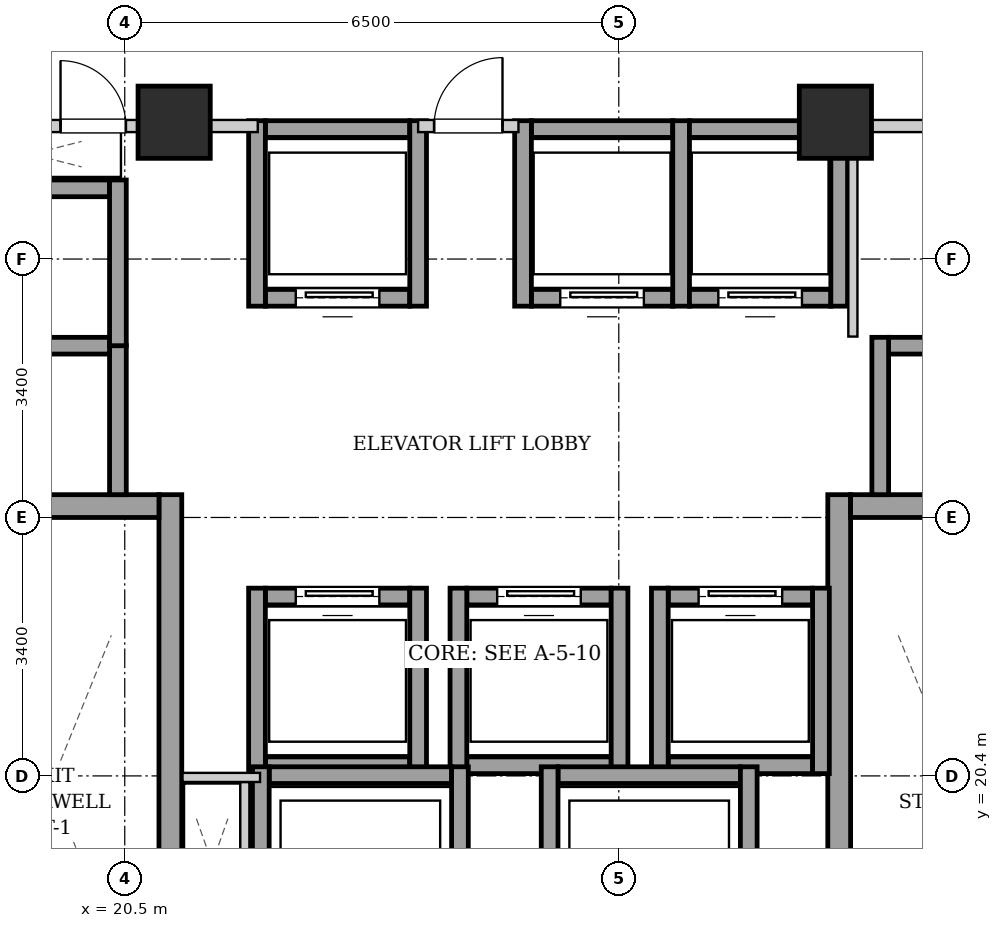
"""IFC4 building model, lengths in metres.
Left out: names, types, materials, properties, quantities, classifications, styles, units other than length and angle.
Written with IfcOpenShell. Run it as: python <this file> out.ifc"""

import sys

from ifc_helpers import new_model, si_unit, direction, frame, frame_2d, origin, origin_2d, place, context, subcontext, project, spatial, rectangle, extrude, element, fill, save


model = new_model("IFC4")
c1 = context("Model", 3, precision=1e-05, world=origin(), true_north=direction((0.0, 1.0)))
c2 = subcontext(c1, "Body", "Model", "MODEL_VIEW")
j1 = project(units=[si_unit("LENGTHUNIT", "METRE"), si_unit("PLANEANGLEUNIT", "RADIAN")], contexts=[c1])
p1 = place(None, origin())
s1 = spatial("IfcSite", under=j1, at=p1, CompositionType="ELEMENT")
p2 = place(p1, origin())
s2 = spatial("IfcBuilding", under=s1, at=p2, CompositionType="ELEMENT")
p3 = place(p2, frame((0.0, 0.0, 124.4)))
s3 = spatial("IfcBuildingStorey", under=s2, at=p3, CompositionType="ELEMENT", Elevation=124.4)
for number, where, z_axis, x_axis in (
    (1, (21.15, 29.0, 0.0), (0.0, 0.0, 1.0), (1.0, 0.0, 0.0)),
    (2, (29.85, 29.0, 0.0), (0.0, 0.0, 1.0), (1.0, 0.0, 0.0)),
):
    element("IfcColumn", number, at=place(p3, frame(where, z_axis=z_axis, x_axis=x_axis)), inside=s3, PredefinedType="COLUMN", context=c2, shape_type="SweptSolid", body=[
        extrude(rectangle(XDim=0.95, YDim=0.95, at=origin_2d()), origin(), (0.0, 0.0, 1.0), 3.25),
    ])
p4 = place(p3, frame((21.1, 15.1, 0.0), z_axis=(0.0, 0.0, 1.0), x_axis=(0.0, 1.0, 0.0)))
e3 = element("IfcWall", 3, at=p4, inside=s3, PredefinedType="SHEAR", context=c2, shape_type="SweptSolid", body=[
    extrude(rectangle(XDim=9.0, YDim=0.3, at=frame_2d((4.5, 0.0))), origin(), (0.0, 0.0, 1.0), 2.99),
])
p5 = place(p3, frame((18.1, 23.95, 0.0), z_axis=(0.0, 0.0, 1.0), x_axis=(1.0, 0.0, 0.0)))
e4 = element("IfcWall", 4, at=p5, inside=s3, PredefinedType="SHEAR", context=c2, shape_type="SweptSolid", body=[
    extrude(rectangle(XDim=2.85, YDim=0.3, at=frame_2d((1.425, 0.0))), origin(), (0.0, 0.0, 1.0), 2.99),
])
p6 = place(p3, frame((29.9, 15.1, 0.0), z_axis=(0.0, 0.0, 1.0), x_axis=(0.0, 1.0, 0.0)))
e5 = element("IfcWall", 5, at=p6, inside=s3, PredefinedType="SHEAR", context=c2, shape_type="SweptSolid", body=[
    extrude(rectangle(XDim=9.0, YDim=0.3, at=frame_2d((4.5, 0.0))), origin(), (0.0, 0.0, 1.0), 2.99),
])
p7 = place(p3, frame((30.05, 23.95, 0.0), z_axis=(0.0, 0.0, 1.0), x_axis=(1.0, 0.0, 0.0)))
e6 = element("IfcWall", 6, at=p7, inside=s3, PredefinedType="SHEAR", context=c2, shape_type="SweptSolid", body=[
    extrude(rectangle(XDim=2.85, YDim=0.3, at=frame_2d((1.425, 0.0))), origin(), (0.0, 0.0, 1.0), 2.99),
])
p8 = place(p3, frame((22.35, 26.69, 0.0), z_axis=(0.0, 0.0, 1.0), x_axis=(1.0, 0.0, 0.0)))
e7 = element("IfcWall", 7, at=p8, inside=s3, PredefinedType="SHEAR", context=c2, shape_type="SweptSolid", body=[
    extrude(rectangle(XDim=1.9, YDim=0.22, at=frame_2d((0.95, 0.0))), origin(), (0.0, 0.0, 1.0), 2.99),
])
p9 = place(p8, frame((0.4, 0.0, 0.0)))
e8 = element("IfcOpeningElement", 8, at=p9, cuts=e7, PredefinedType="OPENING", context=c2, shape_type="SweptSolid", body=[
    extrude(rectangle(XDim=1.1, YDim=2.15, at=frame_2d((0.55, 1.075))), frame((0.0, 0.12, 0.0), z_axis=(0.0, -1.0, 0.0), x_axis=(1.0, 0.0, 0.0)), (0.0, 0.0, 1.0), 0.24),
])
p10 = place(p3, frame((22.35, 28.91, 0.0), z_axis=(0.0, 0.0, 1.0), x_axis=(1.0, 0.0, 0.0)))
e9 = element("IfcWall", 9, at=p10, inside=s3, PredefinedType="SHEAR", context=c2, shape_type="SweptSolid", body=[
    extrude(rectangle(XDim=1.9, YDim=0.22, at=frame_2d((0.95, 0.0))), origin(), (0.0, 0.0, 1.0), 2.99),
])
for number, where, z_axis, x_axis in (
    (10, (22.24, 26.58, 0.0), (0.0, 0.0, 1.0), (0.0, 1.0, 0.0)),
    (11, (24.36, 26.58, 0.0), (0.0, 0.0, 1.0), (0.0, 1.0, 0.0)),
):
    element("IfcWall", number, at=place(p3, frame(where, z_axis=z_axis, x_axis=x_axis)), inside=s3, PredefinedType="SHEAR", context=c2, shape_type="SweptSolid", body=[
        extrude(rectangle(XDim=2.44, YDim=0.22, at=frame_2d((1.22, 0.0))), origin(), (0.0, 0.0, 1.0), 2.99),
    ])
p11 = place(p3, frame((25.85, 26.69, 0.0), z_axis=(0.0, 0.0, 1.0), x_axis=(1.0, 0.0, 0.0)))
e12 = element("IfcWall", 12, at=p11, inside=s3, PredefinedType="SHEAR", context=c2, shape_type="SweptSolid", body=[
    extrude(rectangle(XDim=1.86, YDim=0.22, at=frame_2d((0.93, 0.0))), origin(), (0.0, 0.0, 1.0), 2.99),
])
p12 = place(p11, frame((0.38, 0.0, 0.0)))
e13 = element("IfcOpeningElement", 13, at=p12, cuts=e12, PredefinedType="OPENING", context=c2, shape_type="SweptSolid", body=[
    extrude(rectangle(XDim=1.1, YDim=2.15, at=frame_2d((0.55, 1.075))), frame((0.0, 0.12, 0.0), z_axis=(0.0, -1.0, 0.0), x_axis=(1.0, 0.0, 0.0)), (0.0, 0.0, 1.0), 0.24),
])
p13 = place(p3, frame((25.85, 28.91, 0.0), z_axis=(0.0, 0.0, 1.0), x_axis=(1.0, 0.0, 0.0)))
e14 = element("IfcWall", 14, at=p13, inside=s3, PredefinedType="SHEAR", context=c2, shape_type="SweptSolid", body=[
    extrude(rectangle(XDim=1.86, YDim=0.22, at=frame_2d((0.93, 0.0))), origin(), (0.0, 0.0, 1.0), 2.99),
])
for number, where, z_axis, x_axis in (
    (15, (25.74, 26.58, 0.0), (0.0, 0.0, 1.0), (0.0, 1.0, 0.0)),
    (16, (27.82, 26.58, 0.0), (0.0, 0.0, 1.0), (0.0, 1.0, 0.0)),
):
    element("IfcWall", number, at=place(p3, frame(where, z_axis=z_axis, x_axis=x_axis)), inside=s3, PredefinedType="SHEAR", context=c2, shape_type="SweptSolid", body=[
        extrude(rectangle(XDim=2.44, YDim=0.22, at=frame_2d((1.22, 0.0))), origin(), (0.0, 0.0, 1.0), 2.99),
    ])
p14 = place(p3, frame((27.93, 26.69, 0.0), z_axis=(0.0, 0.0, 1.0), x_axis=(1.0, 0.0, 0.0)))
e17 = element("IfcWall", 17, at=p14, inside=s3, PredefinedType="SHEAR", context=c2, shape_type="SweptSolid", body=[
    extrude(rectangle(XDim=1.86, YDim=0.22, at=frame_2d((0.93, 0.0))), origin(), (0.0, 0.0, 1.0), 2.99),
])
p15 = place(p14, frame((0.38, 0.0, 0.0)))
e18 = element("IfcOpeningElement", 18, at=p15, cuts=e17, PredefinedType="OPENING", context=c2, shape_type="SweptSolid", body=[
    extrude(rectangle(XDim=1.1, YDim=2.15, at=frame_2d((0.55, 1.075))), frame((0.0, 0.12, 0.0), z_axis=(0.0, -1.0, 0.0), x_axis=(1.0, 0.0, 0.0)), (0.0, 0.0, 1.0), 0.24),
])
p16 = place(p3, frame((27.93, 28.91, 0.0), z_axis=(0.0, 0.0, 1.0), x_axis=(1.0, 0.0, 0.0)))
e19 = element("IfcWall", 19, at=p16, inside=s3, PredefinedType="SHEAR", context=c2, shape_type="SweptSolid", body=[
    extrude(rectangle(XDim=1.86, YDim=0.22, at=frame_2d((0.93, 0.0))), origin(), (0.0, 0.0, 1.0), 2.99),
])
p17 = place(p3, frame((29.9, 26.58, 0.0), z_axis=(0.0, 0.0, 1.0), x_axis=(0.0, 1.0, 0.0)))
e20 = element("IfcWall", 20, at=p17, inside=s3, PredefinedType="SHEAR", context=c2, shape_type="SweptSolid", body=[
    extrude(rectangle(XDim=2.44, YDim=0.22, at=frame_2d((1.22, 0.0))), origin(), (0.0, 0.0, 1.0), 2.99),
])
p18 = place(p3, frame((22.35, 20.54, 0.0), z_axis=(0.0, 0.0, 1.0), x_axis=(1.0, 0.0, 0.0)))
e21 = element("IfcWall", 21, at=p18, inside=s3, PredefinedType="SHEAR", context=c2, shape_type="SweptSolid", body=[
    extrude(rectangle(XDim=1.9, YDim=0.22, at=frame_2d((0.95, 0.0))), origin(), (0.0, 0.0, 1.0), 2.99),
])
p19 = place(p3, frame((22.35, 22.76, 0.0), z_axis=(0.0, 0.0, 1.0), x_axis=(1.0, 0.0, 0.0)))
e22 = element("IfcWall", 22, at=p19, inside=s3, PredefinedType="SHEAR", context=c2, shape_type="SweptSolid", body=[
    extrude(rectangle(XDim=1.9, YDim=0.22, at=frame_2d((0.95, 0.0))), origin(), (0.0, 0.0, 1.0), 2.99),
])
p20 = place(p19, frame((0.4, 0.0, 0.0)))
e23 = element("IfcOpeningElement", 23, at=p20, cuts=e22, PredefinedType="OPENING", context=c2, shape_type="SweptSolid", body=[
    extrude(rectangle(XDim=1.1, YDim=2.15, at=frame_2d((0.55, 1.075))), frame((0.0, 0.12, 0.0), z_axis=(0.0, -1.0, 0.0), x_axis=(1.0, 0.0, 0.0)), (0.0, 0.0, 1.0), 0.24),
])
for number, where, z_axis, x_axis in (
    (24, (22.24, 20.43, 0.0), (0.0, 0.0, 1.0), (0.0, 1.0, 0.0)),
    (25, (24.36, 20.43, 0.0), (0.0, 0.0, 1.0), (0.0, 1.0, 0.0)),
):
    element("IfcWall", number, at=place(p3, frame(where, z_axis=z_axis, x_axis=x_axis)), inside=s3, PredefinedType="SHEAR", context=c2, shape_type="SweptSolid", body=[
        extrude(rectangle(XDim=2.44, YDim=0.22, at=frame_2d((1.22, 0.0))), origin(), (0.0, 0.0, 1.0), 2.99),
    ])
p21 = place(p3, frame((25.0, 20.54, 0.0), z_axis=(0.0, 0.0, 1.0), x_axis=(1.0, 0.0, 0.0)))
e26 = element("IfcWall", 26, at=p21, inside=s3, PredefinedType="SHEAR", context=c2, shape_type="SweptSolid", body=[
    extrude(rectangle(XDim=1.9, YDim=0.22, at=frame_2d((0.95, 0.0))), origin(), (0.0, 0.0, 1.0), 2.99),
])
p22 = place(p3, frame((25.0, 22.76, 0.0), z_axis=(0.0, 0.0, 1.0), x_axis=(1.0, 0.0, 0.0)))
e27 = element("IfcWall", 27, at=p22, inside=s3, PredefinedType="SHEAR", context=c2, shape_type="SweptSolid", body=[
    extrude(rectangle(XDim=1.9, YDim=0.22, at=frame_2d((0.95, 0.0))), origin(), (0.0, 0.0, 1.0), 2.99),
])
p23 = place(p22, frame((0.4, 0.0, 0.0)))
e28 = element("IfcOpeningElement", 28, at=p23, cuts=e27, PredefinedType="OPENING", context=c2, shape_type="SweptSolid", body=[
    extrude(rectangle(XDim=1.1, YDim=2.15, at=frame_2d((0.55, 1.075))), frame((0.0, 0.12, 0.0), z_axis=(0.0, -1.0, 0.0), x_axis=(1.0, 0.0, 0.0)), (0.0, 0.0, 1.0), 0.24),
])
for number, where, z_axis, x_axis in (
    (29, (24.89, 20.43, 0.0), (0.0, 0.0, 1.0), (0.0, 1.0, 0.0)),
    (30, (27.01, 20.43, 0.0), (0.0, 0.0, 1.0), (0.0, 1.0, 0.0)),
):
    element("IfcWall", number, at=place(p3, frame(where, z_axis=z_axis, x_axis=x_axis)), inside=s3, PredefinedType="SHEAR", context=c2, shape_type="SweptSolid", body=[
        extrude(rectangle(XDim=2.44, YDim=0.22, at=frame_2d((1.22, 0.0))), origin(), (0.0, 0.0, 1.0), 2.99),
    ])
p24 = place(p3, frame((27.65, 20.54, 0.0), z_axis=(0.0, 0.0, 1.0), x_axis=(1.0, 0.0, 0.0)))
e31 = element("IfcWall", 31, at=p24, inside=s3, PredefinedType="SHEAR", context=c2, shape_type="SweptSolid", body=[
    extrude(rectangle(XDim=1.9, YDim=0.22, at=frame_2d((0.95, 0.0))), origin(), (0.0, 0.0, 1.0), 2.99),
])
p25 = place(p3, frame((27.65, 22.76, 0.0), z_axis=(0.0, 0.0, 1.0), x_axis=(1.0, 0.0, 0.0)))
e32 = element("IfcWall", 32, at=p25, inside=s3, PredefinedType="SHEAR", context=c2, shape_type="SweptSolid", body=[
    extrude(rectangle(XDim=1.9, YDim=0.22, at=frame_2d((0.95, 0.0))), origin(), (0.0, 0.0, 1.0), 2.99),
])
p26 = place(p25, frame((0.4, 0.0, 0.0)))
e33 = element("IfcOpeningElement", 33, at=p26, cuts=e32, PredefinedType="OPENING", context=c2, shape_type="SweptSolid", body=[
    extrude(rectangle(XDim=1.1, YDim=2.15, at=frame_2d((0.55, 1.075))), frame((0.0, 0.12, 0.0), z_axis=(0.0, -1.0, 0.0), x_axis=(1.0, 0.0, 0.0)), (0.0, 0.0, 1.0), 0.24),
])
for number, where, z_axis, x_axis in (
    (34, (27.54, 20.43, 0.0), (0.0, 0.0, 1.0), (0.0, 1.0, 0.0)),
    (35, (29.66, 20.43, 0.0), (0.0, 0.0, 1.0), (0.0, 1.0, 0.0)),
):
    element("IfcWall", number, at=place(p3, frame(where, z_axis=z_axis, x_axis=x_axis)), inside=s3, PredefinedType="SHEAR", context=c2, shape_type="SweptSolid", body=[
        extrude(rectangle(XDim=2.44, YDim=0.22, at=frame_2d((1.22, 0.0))), origin(), (0.0, 0.0, 1.0), 2.99),
    ])
p27 = place(p3, frame((20.41, 24.1, 0.0), z_axis=(0.0, 0.0, 1.0), x_axis=(0.0, 1.0, 0.0)))
e36 = element("IfcWall", 36, at=p27, inside=s3, PredefinedType="SHEAR", context=c2, shape_type="SweptSolid", body=[
    extrude(rectangle(XDim=1.96, YDim=0.22, at=frame_2d((0.98, 0.0))), origin(), (0.0, 0.0, 1.0), 2.99),
])
for number, where, z_axis, x_axis in (
    (37, (18.4, 26.06, 0.0), (0.0, 0.0, 1.0), (1.0, 0.0, 0.0)),
    (38, (18.4, 28.13, 0.0), (0.0, 0.0, 1.0), (1.0, 0.0, 0.0)),
):
    element("IfcWall", number, at=place(p3, frame(where, z_axis=z_axis, x_axis=x_axis)), inside=s3, PredefinedType="SHEAR", context=c2, shape_type="SweptSolid", body=[
        extrude(rectangle(XDim=1.9, YDim=0.22, at=frame_2d((0.95, 0.0))), origin(), (0.0, 0.0, 1.0), 2.99),
    ])
p28 = place(p3, frame((20.41, 26.06, 0.0), z_axis=(0.0, 0.0, 1.0), x_axis=(0.0, 1.0, 0.0)))
e39 = element("IfcWall", 39, at=p28, inside=s3, PredefinedType="SHEAR", context=c2, shape_type="SweptSolid", body=[
    extrude(rectangle(XDim=2.18, YDim=0.22, at=frame_2d((1.09, 0.0))), origin(), (0.0, 0.0, 1.0), 2.99),
])
p29 = place(p3, frame((30.55, 26.06, 0.0), z_axis=(0.0, 0.0, 1.0), x_axis=(1.0, 0.0, 0.0)))
e40 = element("IfcWall", 40, at=p29, inside=s3, PredefinedType="SHEAR", context=c2, shape_type="SweptSolid", body=[
    extrude(rectangle(XDim=1.9, YDim=0.22, at=frame_2d((0.95, 0.0))), origin(), (0.0, 0.0, 1.0), 2.99),
])
p30 = place(p3, frame((30.44, 24.1, 0.0), z_axis=(0.0, 0.0, 1.0), x_axis=(0.0, 1.0, 0.0)))
e41 = element("IfcWall", 41, at=p30, inside=s3, PredefinedType="SHEAR", context=c2, shape_type="SweptSolid", body=[
    extrude(rectangle(XDim=2.07, YDim=0.22, at=frame_2d((1.035, 0.0))), origin(), (0.0, 0.0, 1.0), 2.99),
])
p31 = place(p3, frame((22.4, 20.41, 0.0), z_axis=(0.0, 0.0, 1.0), x_axis=(1.0, 0.0, 0.0)))
e42 = element("IfcWall", 42, at=p31, inside=s3, PredefinedType="SHEAR", context=c2, shape_type="SweptSolid", body=[
    extrude(rectangle(XDim=2.4, YDim=0.22, at=frame_2d((1.2, 0.0))), origin(), (0.0, 0.0, 1.0), 2.99),
])
for number, where, z_axis, x_axis in (
    (43, (22.29, 17.98, 0.0), (0.0, 0.0, 1.0), (0.0, 1.0, 0.0)),
    (44, (24.91, 17.98, 0.0), (0.0, 0.0, 1.0), (0.0, 1.0, 0.0)),
):
    element("IfcWall", number, at=place(p3, frame(where, z_axis=z_axis, x_axis=x_axis)), inside=s3, PredefinedType="SHEAR", context=c2, shape_type="SweptSolid", body=[
        extrude(rectangle(XDim=2.54, YDim=0.22, at=frame_2d((1.27, 0.0))), origin(), (0.0, 0.0, 1.0), 2.99),
    ])
p32 = place(p3, frame((26.2, 20.41, 0.0), z_axis=(0.0, 0.0, 1.0), x_axis=(1.0, 0.0, 0.0)))
e45 = element("IfcWall", 45, at=p32, inside=s3, PredefinedType="SHEAR", context=c2, shape_type="SweptSolid", body=[
    extrude(rectangle(XDim=2.4, YDim=0.22, at=frame_2d((1.2, 0.0))), origin(), (0.0, 0.0, 1.0), 2.99),
])
for number, where, z_axis, x_axis in (
    (46, (26.09, 17.98, 0.0), (0.0, 0.0, 1.0), (0.0, 1.0, 0.0)),
    (47, (28.71, 17.98, 0.0), (0.0, 0.0, 1.0), (0.0, 1.0, 0.0)),
):
    element("IfcWall", number, at=place(p3, frame(where, z_axis=z_axis, x_axis=x_axis)), inside=s3, PredefinedType="SHEAR", context=c2, shape_type="SweptSolid", body=[
        extrude(rectangle(XDim=2.54, YDim=0.22, at=frame_2d((1.27, 0.0))), origin(), (0.0, 0.0, 1.0), 2.99),
    ])
p33 = place(p3, frame((24.36, 28.95, 0.0), z_axis=(0.0, 0.0, 1.0), x_axis=(1.0, 0.0, 0.0)))
e48 = element("IfcWall", 48, at=p33, inside=s3, PredefinedType="PARTITIONING", context=c2, shape_type="SweptSolid", body=[
    extrude(rectangle(XDim=1.32, YDim=0.16, at=frame_2d((0.66, 0.0))), origin(), (0.0, 0.0, 1.0), 2.426),
])
p34 = place(p33, frame((0.21, 0.0, 0.0)))
e49 = element("IfcOpeningElement", 49, at=p34, cuts=e48, PredefinedType="OPENING", context=c2, shape_type="SweptSolid", body=[
    extrude(rectangle(XDim=0.9, YDim=2.05, at=frame_2d((0.45, 1.025))), frame((0.0, 0.09, 0.0), z_axis=(0.0, -1.0, 0.0), x_axis=(1.0, 0.0, 0.0)), (0.0, 0.0, 1.0), 0.18),
])
p35 = place(p3, frame((17.96, 28.95, 0.0), z_axis=(0.0, 0.0, 1.0), x_axis=(1.0, 0.0, 0.0)))
e50 = element("IfcWall", 50, at=p35, inside=s3, PredefinedType="PARTITIONING", context=c2, shape_type="SweptSolid", body=[
    extrude(rectangle(XDim=4.29, YDim=0.16, at=frame_2d((2.145, 0.0))), origin(), (0.0, 0.0, 1.0), 2.426),
])
p36 = place(p35, frame((1.695, 0.0, 0.0)))
e51 = element("IfcOpeningElement", 51, at=p36, cuts=e50, PredefinedType="OPENING", context=c2, shape_type="SweptSolid", body=[
    extrude(rectangle(XDim=0.86, YDim=2.05, at=frame_2d((0.43, 1.025))), frame((0.0, 0.09, 0.0), z_axis=(0.0, -1.0, 0.0), x_axis=(1.0, 0.0, 0.0)), (0.0, 0.0, 1.0), 0.18),
])
p37 = place(p3, frame((22.08, 18.2, 0.0), z_axis=(0.0, 0.0, 1.0), x_axis=(0.0, 1.0, 0.0)))
e52 = element("IfcWall", 52, at=p37, inside=s3, PredefinedType="PARTITIONING", context=c2, shape_type="SweptSolid", body=[
    extrude(rectangle(XDim=2.12, YDim=0.12, at=frame_2d((1.06, 0.0))), origin(), (0.0, 0.0, 1.0), 2.99),
])
p38 = place(p3, frame((22.28, 20.38, 0.0), z_axis=(0.0, 0.0, 1.0), x_axis=(-1.0, 0.0, 0.0)))
e53 = element("IfcWall", 53, at=p38, inside=s3, PredefinedType="PARTITIONING", context=c2, shape_type="SweptSolid", body=[
    extrude(rectangle(XDim=1.02, YDim=0.12, at=frame_2d((0.51, 0.0))), origin(), (0.0, 0.0, 1.0), 2.99),
])
p39 = place(p3, frame((30.08, 26.18, 0.0), z_axis=(0.0, 0.0, 1.0), x_axis=(0.0, 1.0, 0.0)))
e54 = element("IfcWall", 54, at=p39, inside=s3, PredefinedType="PARTITIONING", context=c2, shape_type="SweptSolid", body=[
    extrude(rectangle(XDim=2.68, YDim=0.12, at=frame_2d((1.34, 0.0))), origin(), (0.0, 0.0, 1.0), 2.99),
])
p40 = place(p3, frame((30.08, 28.95, 0.0), z_axis=(0.0, 0.0, 1.0), x_axis=(1.0, 0.0, 0.0)))
e55 = element("IfcWall", 55, at=p40, inside=s3, PredefinedType="PARTITIONING", context=c2, shape_type="SweptSolid", body=[
    extrude(rectangle(XDim=2.96, YDim=0.16, at=frame_2d((1.48, 0.0))), origin(), (0.0, 0.0, 1.0), 2.99),
])
p41 = place(p40, frame((1.045, 0.0, 0.0)))
e56 = element("IfcOpeningElement", 56, at=p41, cuts=e55, PredefinedType="OPENING", context=c2, shape_type="SweptSolid", body=[
    extrude(rectangle(XDim=0.86, YDim=2.05, at=frame_2d((0.43, 1.025))), frame((0.0, 0.09, 0.0), z_axis=(0.0, -1.0, 0.0), x_axis=(1.0, 0.0, 0.0)), (0.0, 0.0, 1.0), 0.18),
])
p42 = place(p9, origin())
e57 = element("IfcDoor", 57, at=p42, inside=s3, OperationType="SLIDING_TO_LEFT", PredefinedType="DOOR", context=c2, shape_type="SweptSolid", body=[
    extrude(rectangle(XDim=1.1, YDim=2.15, at=frame_2d((0.55, 1.075))), frame((0.0, 0.025, 0.0), z_axis=(0.0, -1.0, 0.0), x_axis=(1.0, 0.0, 0.0)), (0.0, 0.0, 1.0), 0.05),
])
fill(e8, e57)
p43 = place(p12, origin())
e58 = element("IfcDoor", 58, at=p43, inside=s3, OperationType="SLIDING_TO_LEFT", PredefinedType="DOOR", context=c2, shape_type="SweptSolid", body=[
    extrude(rectangle(XDim=1.1, YDim=2.15, at=frame_2d((0.55, 1.075))), frame((0.0, 0.025, 0.0), z_axis=(0.0, -1.0, 0.0), x_axis=(1.0, 0.0, 0.0)), (0.0, 0.0, 1.0), 0.05),
])
fill(e13, e58)
p44 = place(p15, origin())
e59 = element("IfcDoor", 59, at=p44, inside=s3, OperationType="SLIDING_TO_LEFT", PredefinedType="DOOR", context=c2, shape_type="SweptSolid", body=[
    extrude(rectangle(XDim=1.1, YDim=2.15, at=frame_2d((0.55, 1.075))), frame((0.0, 0.025, 0.0), z_axis=(0.0, -1.0, 0.0), x_axis=(1.0, 0.0, 0.0)), (0.0, 0.0, 1.0), 0.05),
])
fill(e18, e59)
p45 = place(p20, origin())
e60 = element("IfcDoor", 60, at=p45, inside=s3, OperationType="SLIDING_TO_LEFT", PredefinedType="DOOR", context=c2, shape_type="SweptSolid", body=[
    extrude(rectangle(XDim=1.1, YDim=2.15, at=frame_2d((0.55, 1.075))), frame((0.0, 0.025, 0.0), z_axis=(0.0, -1.0, 0.0), x_axis=(1.0, 0.0, 0.0)), (0.0, 0.0, 1.0), 0.05),
])
fill(e23, e60)
p46 = place(p23, origin())
e61 = element("IfcDoor", 61, at=p46, inside=s3, OperationType="SLIDING_TO_LEFT", PredefinedType="DOOR", context=c2, shape_type="SweptSolid", body=[
    extrude(rectangle(XDim=1.1, YDim=2.15, at=frame_2d((0.55, 1.075))), frame((0.0, 0.025, 0.0), z_axis=(0.0, -1.0, 0.0), x_axis=(1.0, 0.0, 0.0)), (0.0, 0.0, 1.0), 0.05),
])
fill(e28, e61)
p47 = place(p26, origin())
e62 = element("IfcDoor", 62, at=p47, inside=s3, OperationType="SLIDING_TO_LEFT", PredefinedType="DOOR", context=c2, shape_type="SweptSolid", body=[
    extrude(rectangle(XDim=1.1, YDim=2.15, at=frame_2d((0.55, 1.075))), frame((0.0, 0.025, 0.0), z_axis=(0.0, -1.0, 0.0), x_axis=(1.0, 0.0, 0.0)), (0.0, 0.0, 1.0), 0.05),
])
fill(e33, e62)
p48 = place(p34, origin())
e63 = element("IfcDoor", 63, at=p48, inside=s3, OperationType="SINGLE_SWING_RIGHT", PredefinedType="DOOR", context=c2, shape_type="SweptSolid", body=[
    extrude(rectangle(XDim=0.9, YDim=2.05, at=frame_2d((0.45, 1.025))), frame((0.0, 0.025, 0.0), z_axis=(0.0, -1.0, 0.0), x_axis=(1.0, 0.0, 0.0)), (0.0, 0.0, 1.0), 0.05),
])
fill(e49, e63)
p49 = place(p36, origin())
e64 = element("IfcDoor", 64, at=p49, inside=s3, OperationType="SINGLE_SWING_LEFT", PredefinedType="DOOR", context=c2, shape_type="SweptSolid", body=[
    extrude(rectangle(XDim=0.86, YDim=2.05, at=frame_2d((0.43, 1.025))), frame((0.0, 0.025, 0.0), z_axis=(0.0, -1.0, 0.0), x_axis=(1.0, 0.0, 0.0)), (0.0, 0.0, 1.0), 0.05),
])
fill(e51, e64)
save(model, sys.argv[1])
